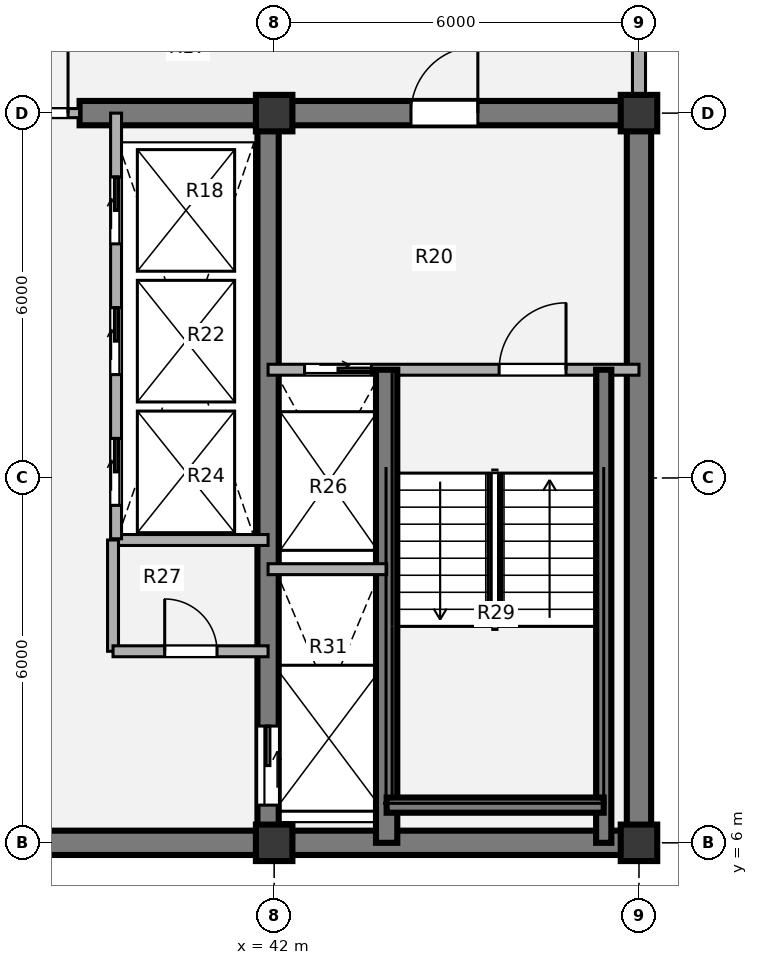
"""IFC4 building model, lengths in metres.
Left out: names, types, materials, properties, quantities, classifications, styles, units other than length and angle.
Written with IfcOpenShell. Run it as: python <this file> out.ifc"""

import sys

from ifc_helpers import new_model, si_unit, direction, frame, frame_2d, origin, origin_2d, place, context, subcontext, project, spatial, rectangle, extrude, source, transform, mapped, element, fill, save


model = new_model("IFC4")
c1 = context("Model", 3, precision=1e-05, world=origin(), true_north=direction((0.0, 1.0)))
c2 = subcontext(c1, "Body", "Model", "MODEL_VIEW")
j1 = project(units=[si_unit("LENGTHUNIT", "METRE"), si_unit("PLANEANGLEUNIT", "RADIAN")], contexts=[c1])
p1 = place(None, origin())
s1 = spatial("IfcSite", under=j1, at=p1, CompositionType="ELEMENT")
p2 = place(p1, origin())
s2 = spatial("IfcBuilding", under=s1, at=p2, CompositionType="ELEMENT")
p3 = place(p2, frame((0.0, 0.0, 241.92)))
s3 = spatial("IfcBuildingStorey", under=s2, at=p3, CompositionType="ELEMENT", Elevation=241.92)
m1 = source(origin(), c2, "Body", "SweptSolid", [
    extrude(rectangle(XDim=0.6, YDim=0.6, at=origin_2d()), origin(), (0.0, 0.0, 1.0), 3.78),
])
for number, where, z_axis, x_axis in (
    (1, (42.0, 6.0, 0.0), (0.0, 0.0, 1.0), (1.0, 0.0, 0.0)),
    (2, (48.0, 6.0, 0.0), (0.0, 0.0, 1.0), (1.0, 0.0, 0.0)),
    (3, (42.0, 18.0, 0.0), (0.0, 0.0, 1.0), (1.0, 0.0, 0.0)),
    (4, (48.0, 18.0, 0.0), (0.0, 0.0, 1.0), (1.0, 0.0, 0.0)),
):
    element("IfcColumn", number, at=place(p3, frame(where, z_axis=z_axis, x_axis=x_axis)), inside=s3, PredefinedType="COLUMN", context=c2, shape_type="MappedRepresentation", body=[
        mapped(m1, transform((0.0, 0.0, 0.0), x_axis=(1.0, 0.0, 0.0), y_axis=(0.0, 1.0, 0.0), z_axis=(0.0, 0.0, 1.0), scale=1.0)),
    ])
p4 = place(p3, frame((48.2, 6.0, 0.0), z_axis=(0.0, 0.0, 1.0), x_axis=(-1.0, 0.0, 0.0)))
e5 = element("IfcWall", 5, at=p4, inside=s3, PredefinedType="SHEAR", context=c2, shape_type="SweptSolid", body=[
    extrude(rectangle(XDim=24.4, YDim=0.4, at=frame_2d((12.2, 0.0))), origin(), (0.0, 0.0, 1.0), 3.78),
])
p5 = place(p3, frame((48.0, 18.0, 0.0), z_axis=(0.0, 0.0, 1.0), x_axis=(0.0, -1.0, 0.0)))
e6 = element("IfcWall", 6, at=p5, inside=s3, PredefinedType="SHEAR", context=c2, shape_type="SweptSolid", body=[
    extrude(rectangle(XDim=12.0, YDim=0.4, at=frame_2d((6.0, 0.0))), origin(), (0.0, 0.0, 1.0), 3.78),
])
p6 = place(p3, frame((38.8, 18.0, 0.0), z_axis=(0.0, 0.0, 1.0), x_axis=(1.0, 0.0, 0.0)))
e7 = element("IfcWall", 7, at=p6, inside=s3, PredefinedType="SHEAR", context=c2, shape_type="SweptSolid", body=[
    extrude(rectangle(XDim=9.4, YDim=0.4, at=frame_2d((4.7, 0.0))), origin(), (0.0, 0.0, 1.0), 3.78),
])
p7 = place(p6, frame((5.45, 0.0, 0.0)))
e8 = element("IfcOpeningElement", 8, at=p7, cuts=e7, PredefinedType="OPENING", context=c2, shape_type="SweptSolid", body=[
    extrude(rectangle(XDim=1.1, YDim=2.1, at=origin_2d()), frame((0.55, 0.21, 1.05), z_axis=(0.0, -1.0, 0.0), x_axis=(1.0, 0.0, 0.0)), (0.0, 0.0, 1.0), 0.42),
])
p8 = place(p3, frame((41.9, 18.0, 0.0), z_axis=(0.0, 0.0, 1.0), x_axis=(0.0, -1.0, 0.0)))
e9 = element("IfcWall", 9, at=p8, inside=s3, PredefinedType="SHEAR", context=c2, shape_type="SweptSolid", body=[
    extrude(rectangle(XDim=12.0, YDim=0.35, at=frame_2d((6.0, 0.0))), origin(), (0.0, 0.0, 1.0), 3.78),
])
p9 = place(p8, frame((10.08, 0.0, 0.0)))
e10 = element("IfcOpeningElement", 10, at=p9, cuts=e9, PredefinedType="OPENING", context=c2, shape_type="SweptSolid", body=[
    extrude(rectangle(XDim=1.3, YDim=2.1, at=origin_2d()), frame((0.65, 0.185, 1.05), z_axis=(0.0, -1.0, 0.0), x_axis=(1.0, 0.0, 0.0)), (0.0, 0.0, 1.0), 0.37),
])
p10 = place(p3, frame((48.0, 21.05, 0.0), z_axis=(0.0, 0.0, 1.0), x_axis=(0.0, -1.0, 0.0)))
e11 = element("IfcWall", 11, at=p10, inside=s3, PredefinedType="SOLIDWALL", context=c2, shape_type="SweptSolid", body=[
    extrude(rectangle(XDim=2.77, YDim=0.215, at=frame_2d((1.385, 0.0))), origin(), (0.0, 0.0, 1.0), 2.718),
])
p11 = place(p3, frame((39.35, 10.98, 0.0), z_axis=(0.0, 0.0, 1.0), x_axis=(1.0, 0.0, 0.0)))
e12 = element("IfcWall", 12, at=p11, inside=s3, PredefinedType="PARTITIONING", context=c2, shape_type="SweptSolid", body=[
    extrude(rectangle(XDim=2.55, YDim=0.18, at=frame_2d((1.275, 0.0))), origin(), (0.0, 0.0, 1.0), 3.5),
])
p12 = place(p3, frame((39.35, 9.15, 0.0), z_axis=(0.0, 0.0, 1.0), x_axis=(0.0, 1.0, 0.0)))
e13 = element("IfcWall", 13, at=p12, inside=s3, PredefinedType="PARTITIONING", context=c2, shape_type="SweptSolid", body=[
    extrude(rectangle(XDim=1.83, YDim=0.18, at=frame_2d((0.915, 0.0))), origin(), (0.0, 0.0, 1.0), 3.5),
])
p13 = place(p3, frame((39.35, 9.15, 0.0), z_axis=(0.0, 0.0, 1.0), x_axis=(1.0, 0.0, 0.0)))
e14 = element("IfcWall", 14, at=p13, inside=s3, PredefinedType="PARTITIONING", context=c2, shape_type="SweptSolid", body=[
    extrude(rectangle(XDim=2.55, YDim=0.18, at=frame_2d((1.275, 0.0))), origin(), (0.0, 0.0, 1.0), 3.5),
])
p14 = place(p13, frame((0.85, 0.0, 0.0)))
e15 = element("IfcOpeningElement", 15, at=p14, cuts=e14, PredefinedType="OPENING", context=c2, shape_type="SweptSolid", body=[
    extrude(rectangle(XDim=0.86, YDim=2.1, at=origin_2d()), frame((0.43, 0.1, 1.05), z_axis=(0.0, -1.0, 0.0), x_axis=(1.0, 0.0, 0.0)), (0.0, 0.0, 1.0), 0.2),
])
p15 = place(p3, frame((33.2, 18.0, 0.0), z_axis=(0.0, 0.0, 1.0), x_axis=(1.0, 0.0, 0.0)))
e16 = element("IfcWall", 16, at=p15, inside=s3, PredefinedType="PARTITIONING", context=c2, shape_type="SweptSolid", body=[
    extrude(rectangle(XDim=5.6, YDim=0.15, at=frame_2d((2.8, 0.0))), origin(), (0.0, 0.0, 1.0), 2.515),
])
p16 = place(p15, frame((0.19, 0.0, 0.0)))
e17 = element("IfcOpeningElement", 17, at=p16, cuts=e16, PredefinedType="OPENING", context=c2, shape_type="SweptSolid", body=[
    extrude(rectangle(XDim=1.1, YDim=2.1, at=origin_2d()), frame((0.55, 0.085, 1.05), z_axis=(0.0, -1.0, 0.0), x_axis=(1.0, 0.0, 0.0)), (0.0, 0.0, 1.0), 0.17),
])
p17 = place(p15, frame((4.31, 0.0, 0.0)))
e18 = element("IfcOpeningElement", 18, at=p17, cuts=e16, PredefinedType="OPENING", context=c2, shape_type="SweptSolid", body=[
    extrude(rectangle(XDim=1.1, YDim=2.1, at=origin_2d()), frame((0.55, 0.085, 1.05), z_axis=(0.0, -1.0, 0.0), x_axis=(1.0, 0.0, 0.0)), (0.0, 0.0, 1.0), 0.17),
])
p18 = place(p3, frame((41.9, 13.78, 0.0), z_axis=(0.0, 0.0, 1.0), x_axis=(1.0, 0.0, 0.0)))
e19 = element("IfcWall", 19, at=p18, inside=s3, PredefinedType="PARTITIONING", context=c2, shape_type="SweptSolid", body=[
    extrude(rectangle(XDim=6.1, YDim=0.18, at=frame_2d((3.05, 0.0))), origin(), (0.0, 0.0, 1.0), 3.5),
])
p19 = place(p18, frame((0.6, 0.0, 0.0)))
e20 = element("IfcOpeningElement", 20, at=p19, cuts=e19, PredefinedType="OPENING", context=c2, shape_type="SweptSolid", body=[
    extrude(rectangle(XDim=1.1, YDim=2.1, at=origin_2d()), frame((0.55, 0.1, 1.05), z_axis=(0.0, -1.0, 0.0), x_axis=(1.0, 0.0, 0.0)), (0.0, 0.0, 1.0), 0.2),
])
p20 = place(p18, frame((3.8, 0.0, 0.0)))
e21 = element("IfcOpeningElement", 21, at=p20, cuts=e19, PredefinedType="OPENING", context=c2, shape_type="SweptSolid", body=[
    extrude(rectangle(XDim=1.1, YDim=2.1, at=origin_2d()), frame((0.55, 0.1, 1.05), z_axis=(0.0, -1.0, 0.0), x_axis=(1.0, 0.0, 0.0)), (0.0, 0.0, 1.0), 0.2),
])
p21 = place(p3, frame((43.85, 6.0, 0.0), z_axis=(0.0, 0.0, 1.0), x_axis=(0.0, 1.0, 0.0)))
e22 = element("IfcWall", 22, at=p21, inside=s3, PredefinedType="SHEAR", context=c2, shape_type="SweptSolid", body=[
    extrude(rectangle(XDim=7.78, YDim=0.35, at=frame_2d((3.89, 0.0))), origin(), (0.0, 0.0, 1.0), 3.85),
])
p22 = place(p3, frame((47.42, 6.0, 0.0), z_axis=(0.0, 0.0, 1.0), x_axis=(0.0, 1.0, 0.0)))
e23 = element("IfcWall", 23, at=p22, inside=s3, PredefinedType="SHEAR", context=c2, shape_type="SweptSolid", body=[
    extrude(rectangle(XDim=7.78, YDim=0.25, at=frame_2d((3.89, 0.0))), origin(), (0.0, 0.0, 1.0), 3.85),
])
p23 = place(p3, frame((43.85, 6.62, 0.0), z_axis=(0.0, 0.0, 1.0), x_axis=(1.0, 0.0, 0.0)))
e24 = element("IfcWall", 24, at=p23, inside=s3, PredefinedType="SHEAR", context=c2, shape_type="SweptSolid", body=[
    extrude(rectangle(XDim=3.57, YDim=0.25, at=frame_2d((1.785, 0.0))), origin(), (0.0, 0.0, 1.0), 3.85),
])
p24 = place(p3, frame((41.9, 10.5, 0.0), z_axis=(0.0, 0.0, 1.0), x_axis=(1.0, 0.0, 0.0)))
e25 = element("IfcWall", 25, at=p24, inside=s3, PredefinedType="PARTITIONING", context=c2, shape_type="SweptSolid", body=[
    extrude(rectangle(XDim=1.95, YDim=0.18, at=frame_2d((0.975, 0.0))), origin(), (0.0, 0.0, 1.0), 3.5),
])
p25 = place(p3, frame((39.4, 11.0, 0.0), z_axis=(0.0, 0.0, 1.0), x_axis=(0.0, 1.0, 0.0)))
e26 = element("IfcWall", 26, at=p25, inside=s3, PredefinedType="PARTITIONING", context=c2, shape_type="SweptSolid", body=[
    extrude(rectangle(XDim=7.0, YDim=0.18, at=frame_2d((3.5, 0.0))), origin(), (0.0, 0.0, 1.0), 3.5),
])
p26 = place(p25, frame((0.55, 0.0, 0.0)))
e27 = element("IfcOpeningElement", 27, at=p26, cuts=e26, PredefinedType="OPENING", context=c2, shape_type="SweptSolid", body=[
    extrude(rectangle(XDim=1.1, YDim=2.1, at=origin_2d()), frame((0.55, 0.1, 1.05), z_axis=(0.0, -1.0, 0.0), x_axis=(1.0, 0.0, 0.0)), (0.0, 0.0, 1.0), 0.2),
])
p27 = place(p25, frame((2.7, 0.0, 0.0)))
e28 = element("IfcOpeningElement", 28, at=p27, cuts=e26, PredefinedType="OPENING", context=c2, shape_type="SweptSolid", body=[
    extrude(rectangle(XDim=1.1, YDim=2.1, at=origin_2d()), frame((0.55, 0.1, 1.05), z_axis=(0.0, -1.0, 0.0), x_axis=(1.0, 0.0, 0.0)), (0.0, 0.0, 1.0), 0.2),
])
p28 = place(p25, frame((4.85, 0.0, 0.0)))
e29 = element("IfcOpeningElement", 29, at=p28, cuts=e26, PredefinedType="OPENING", context=c2, shape_type="SweptSolid", body=[
    extrude(rectangle(XDim=1.1, YDim=2.1, at=origin_2d()), frame((0.55, 0.1, 1.05), z_axis=(0.0, -1.0, 0.0), x_axis=(1.0, 0.0, 0.0)), (0.0, 0.0, 1.0), 0.2),
])
m2 = source(origin(), c2, "Body", "SweptSolid", [
    extrude(rectangle(XDim=0.86, YDim=2.1, at=origin_2d()), frame((0.43, 0.025, 1.05), z_axis=(0.0, -1.0, 0.0), x_axis=(1.0, 0.0, 0.0)), (0.0, 0.0, 1.0), 0.05),
])
p29 = place(p14, origin())
e30 = element("IfcDoor", 30, at=p29, inside=s3, OperationType="SINGLE_SWING_LEFT", PredefinedType="DOOR", context=c2, shape_type="MappedRepresentation", body=[
    mapped(m2, transform((0.0, 0.0, 0.0), x_axis=(1.0, 0.0, 0.0), y_axis=(0.0, 1.0, 0.0), z_axis=(0.0, 0.0, 1.0), scale=1.0)),
])
fill(e15, e30)
m3 = source(origin(), c2, "Body", "SweptSolid", [
    extrude(rectangle(XDim=1.1, YDim=2.1, at=origin_2d()), frame((0.55, 0.025, 1.05), z_axis=(0.0, -1.0, 0.0), x_axis=(1.0, 0.0, 0.0)), (0.0, 0.0, 1.0), 0.05),
])
p30 = place(p17, origin())
e31 = element("IfcDoor", 31, at=p30, inside=s3, OperationType="SINGLE_SWING_RIGHT", PredefinedType="DOOR", context=c2, shape_type="MappedRepresentation", body=[
    mapped(m3, transform((0.0, 0.0, 0.0), x_axis=(1.0, 0.0, 0.0), y_axis=(0.0, 1.0, 0.0), z_axis=(0.0, 0.0, 1.0), scale=1.0)),
])
fill(e18, e31)
m4 = source(origin(), c2, "Body", "SweptSolid", [
    extrude(rectangle(XDim=1.1, YDim=2.1, at=origin_2d()), frame((0.55, 0.025, 1.05), z_axis=(0.0, -1.0, 0.0), x_axis=(1.0, 0.0, 0.0)), (0.0, 0.0, 1.0), 0.05),
])
p31 = place(p19, origin())
e32 = element("IfcDoor", 32, at=p31, inside=s3, OperationType="SLIDING_TO_RIGHT", PredefinedType="DOOR", context=c2, shape_type="MappedRepresentation", body=[
    mapped(m4, transform((0.0, 0.0, 0.0), x_axis=(1.0, 0.0, 0.0), y_axis=(0.0, 1.0, 0.0), z_axis=(0.0, 0.0, 1.0), scale=1.0)),
])
fill(e20, e32)
m5 = source(origin(), c2, "Body", "SweptSolid", [
    extrude(rectangle(XDim=1.1, YDim=2.1, at=origin_2d()), frame((0.55, 0.025, 1.05), z_axis=(0.0, -1.0, 0.0), x_axis=(1.0, 0.0, 0.0)), (0.0, 0.0, 1.0), 0.05),
])
p32 = place(p20, origin())
e33 = element("IfcDoor", 33, at=p32, inside=s3, OperationType="SINGLE_SWING_RIGHT", PredefinedType="DOOR", context=c2, shape_type="MappedRepresentation", body=[
    mapped(m5, transform((0.0, 0.0, 0.0), x_axis=(1.0, 0.0, 0.0), y_axis=(0.0, 1.0, 0.0), z_axis=(0.0, 0.0, 1.0), scale=1.0)),
])
fill(e21, e33)
m6 = source(origin(), c2, "Body", "SweptSolid", [
    extrude(rectangle(XDim=1.3, YDim=2.1, at=origin_2d()), frame((0.65, 0.025, 1.05), z_axis=(0.0, -1.0, 0.0), x_axis=(1.0, 0.0, 0.0)), (0.0, 0.0, 1.0), 0.05),
])
p33 = place(p9, origin())
e34 = element("IfcDoor", 34, at=p33, inside=s3, OperationType="SLIDING_TO_LEFT", PredefinedType="DOOR", context=c2, shape_type="MappedRepresentation", body=[
    mapped(m6, transform((0.0, 0.0, 0.0), x_axis=(1.0, 0.0, 0.0), y_axis=(0.0, 1.0, 0.0), z_axis=(0.0, 0.0, 1.0), scale=1.0)),
])
fill(e10, e34)
p34 = place(p7, origin())
e35 = element("IfcDoor", 35, at=p34, inside=s3, OperationType="SINGLE_SWING_RIGHT", PredefinedType="DOOR", context=c2, shape_type="MappedRepresentation", body=[
    mapped(m3, transform((0.0, 0.0, 0.0), x_axis=(1.0, 0.0, 0.0), y_axis=(0.0, 1.0, 0.0), z_axis=(0.0, 0.0, 1.0), scale=1.0)),
])
fill(e8, e35)
p35 = place(p26, origin())
e36 = element("IfcDoor", 36, at=p35, inside=s3, OperationType="SLIDING_TO_RIGHT", PredefinedType="DOOR", context=c2, shape_type="MappedRepresentation", body=[
    mapped(m4, transform((0.0, 0.0, 0.0), x_axis=(1.0, 0.0, 0.0), y_axis=(0.0, 1.0, 0.0), z_axis=(0.0, 0.0, 1.0), scale=1.0)),
])
fill(e27, e36)
p36 = place(p27, origin())
e37 = element("IfcDoor", 37, at=p36, inside=s3, OperationType="SLIDING_TO_RIGHT", PredefinedType="DOOR", context=c2, shape_type="MappedRepresentation", body=[
    mapped(m4, transform((0.0, 0.0, 0.0), x_axis=(1.0, 0.0, 0.0), y_axis=(0.0, 1.0, 0.0), z_axis=(0.0, 0.0, 1.0), scale=1.0)),
])
fill(e28, e37)
p37 = place(p28, origin())
e38 = element("IfcDoor", 38, at=p37, inside=s3, OperationType="SLIDING_TO_RIGHT", PredefinedType="DOOR", context=c2, shape_type="MappedRepresentation", body=[
    mapped(m4, transform((0.0, 0.0, 0.0), x_axis=(1.0, 0.0, 0.0), y_axis=(0.0, 1.0, 0.0), z_axis=(0.0, 0.0, 1.0), scale=1.0)),
])
fill(e29, e38)
save(model, sys.argv[1])
